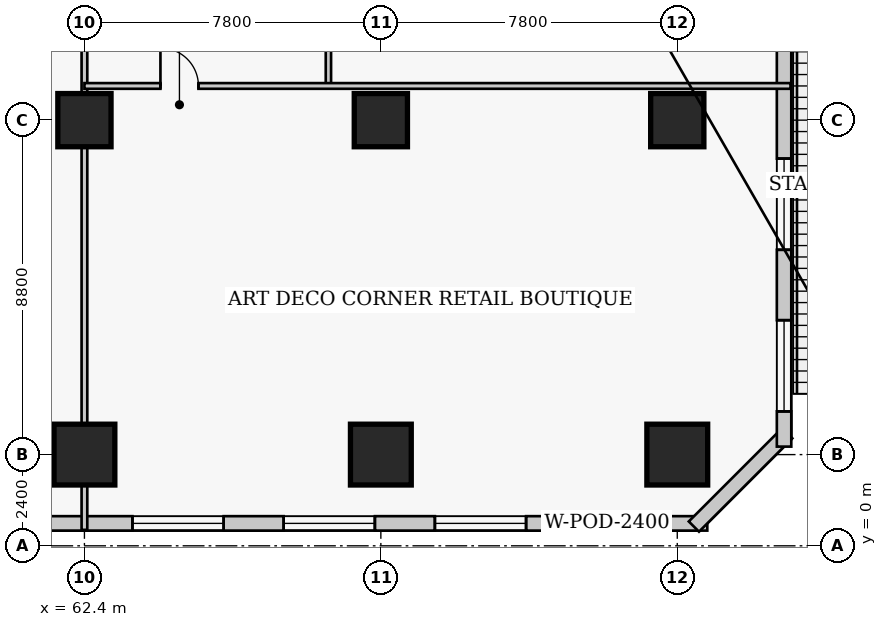
"""IFC4 building model, lengths in metres.
Left out: names, types, materials, properties, quantities, classifications, styles, units other than length and angle.
Written with IfcOpenShell. Run it as: python <this file> out.ifc"""

import sys

from ifc_helpers import new_model, si_unit, direction, frame, frame_2d, origin, origin_2d, place, context, subcontext, project, spatial, rectangle, extrude, element, fill, save


model = new_model("IFC4")
c1 = context("Model", 3, precision=1e-05, world=origin(), true_north=direction((0.0, 1.0)))
c2 = subcontext(c1, "Body", "Model", "MODEL_VIEW")
j1 = project(units=[si_unit("LENGTHUNIT", "METRE"), si_unit("PLANEANGLEUNIT", "RADIAN")], contexts=[c1])
p1 = place(None, origin())
s1 = spatial("IfcSite", under=j1, at=p1, CompositionType="ELEMENT")
p2 = place(p1, origin())
s2 = spatial("IfcBuilding", under=s1, at=p2, CompositionType="ELEMENT")
p3 = place(p2, origin())
s3 = spatial("IfcBuildingStorey", under=s2, at=p3, CompositionType="ELEMENT", Elevation=0.0)
p4 = place(p3, frame((62.4, 2.4, 0.0), z_axis=(0.0, 0.0, 1.0), x_axis=(1.0, 0.0, 0.0)))
e1 = element("IfcColumn", 1, at=p4, inside=s3, PredefinedType="COLUMN", context=c2, shape_type="SweptSolid", body=[
    extrude(rectangle(XDim=1.6, YDim=1.6, at=origin_2d()), origin(), (0.0, 0.0, 1.0), 5.4),
])
p5 = place(p3, frame((62.4, 11.2, 0.0), z_axis=(0.0, 0.0, 1.0), x_axis=(1.0, 0.0, 0.0)))
e2 = element("IfcColumn", 2, at=p5, inside=s3, PredefinedType="COLUMN", context=c2, shape_type="SweptSolid", body=[
    extrude(rectangle(XDim=1.4, YDim=1.4, at=origin_2d()), origin(), (0.0, 0.0, 1.0), 5.4),
])
p6 = place(p3, frame((70.2, 2.4, 0.0), z_axis=(0.0, 0.0, 1.0), x_axis=(1.0, 0.0, 0.0)))
e3 = element("IfcColumn", 3, at=p6, inside=s3, PredefinedType="COLUMN", context=c2, shape_type="SweptSolid", body=[
    extrude(rectangle(XDim=1.6, YDim=1.6, at=origin_2d()), origin(), (0.0, 0.0, 1.0), 5.4),
])
p7 = place(p3, frame((70.2, 11.2, 0.0), z_axis=(0.0, 0.0, 1.0), x_axis=(1.0, 0.0, 0.0)))
e4 = element("IfcColumn", 4, at=p7, inside=s3, PredefinedType="COLUMN", context=c2, shape_type="SweptSolid", body=[
    extrude(rectangle(XDim=1.4, YDim=1.4, at=origin_2d()), origin(), (0.0, 0.0, 1.0), 5.4),
])
p8 = place(p3, frame((78.0, 2.4, 0.0), z_axis=(0.0, 0.0, 1.0), x_axis=(1.0, 0.0, 0.0)))
e5 = element("IfcColumn", 5, at=p8, inside=s3, PredefinedType="COLUMN", context=c2, shape_type="SweptSolid", body=[
    extrude(rectangle(XDim=1.6, YDim=1.6, at=origin_2d()), origin(), (0.0, 0.0, 1.0), 5.4),
])
p9 = place(p3, frame((78.0, 11.2, 0.0), z_axis=(0.0, 0.0, 1.0), x_axis=(1.0, 0.0, 0.0)))
e6 = element("IfcColumn", 6, at=p9, inside=s3, PredefinedType="COLUMN", context=c2, shape_type="SweptSolid", body=[
    extrude(rectangle(XDim=1.4, YDim=1.4, at=origin_2d()), origin(), (0.0, 0.0, 1.0), 5.4),
])
p10 = place(p3, frame((78.79, 0.59, 0.0), z_axis=(0.0, 0.0, 1.0), x_axis=(-1.0, 0.0, 0.0)))
e7 = element("IfcWall", 7, at=p10, inside=s3, PredefinedType="SOLIDWALL", context=c2, shape_type="SweptSolid", body=[
    extrude(rectangle(XDim=79.58, YDim=0.38, at=frame_2d((39.79, 0.0))), origin(), (0.0, 0.0, 1.0), 5.1),
])
p11 = place(p10, frame((68.44, 0.0, 0.0)))
e8 = element("IfcOpeningElement", 8, at=p11, cuts=e7, PredefinedType="OPENING", context=c2, shape_type="SweptSolid", body=[
    extrude(rectangle(XDim=1.6, YDim=2.2, at=frame_2d((0.8, 1.1))), frame((0.0, 0.2, 0.0), z_axis=(0.0, -1.0, 0.0), x_axis=(1.0, 0.0, 0.0)), (0.0, 0.0, 1.0), 0.4),
])
p12 = place(p10, frame((56.79, 0.0, 0.0)))
e9 = element("IfcOpeningElement", 9, at=p12, cuts=e7, PredefinedType="OPENING", context=c2, shape_type="SweptSolid", body=[
    extrude(rectangle(XDim=2.4, YDim=2.55, at=frame_2d((1.2, 1.275))), frame((0.0, 0.2, 0.0), z_axis=(0.0, -1.0, 0.0), x_axis=(1.0, 0.0, 0.0)), (0.0, 0.0, 1.0), 0.4),
])
p13 = place(p10, frame((38.59, 0.0, 0.0)))
e10 = element("IfcOpeningElement", 10, at=p13, cuts=e7, PredefinedType="OPENING", context=c2, shape_type="SweptSolid", body=[
    extrude(rectangle(XDim=2.4, YDim=2.55, at=frame_2d((1.2, 1.275))), frame((0.0, 0.2, 0.0), z_axis=(0.0, -1.0, 0.0), x_axis=(1.0, 0.0, 0.0)), (0.0, 0.0, 1.0), 0.4),
])
p14 = place(p10, frame((19.49, 0.0, 0.0)))
e11 = element("IfcOpeningElement", 11, at=p14, cuts=e7, PredefinedType="OPENING", context=c2, shape_type="SweptSolid", body=[
    extrude(rectangle(XDim=1.6, YDim=2.2, at=frame_2d((0.8, 1.1))), frame((0.0, 0.2, 0.0), z_axis=(0.0, -1.0, 0.0), x_axis=(1.0, 0.0, 0.0)), (0.0, 0.0, 1.0), 0.4),
])
p15 = place(p10, frame((1.439, 0.0, 0.75)))
e12 = element("IfcOpeningElement", 12, at=p15, cuts=e7, PredefinedType="OPENING", context=c2, shape_type="SweptSolid", body=[
    extrude(rectangle(XDim=2.4, YDim=2.2, at=frame_2d((1.2, 1.1))), frame((0.0, 0.2, 0.0), z_axis=(0.0, -1.0, 0.0), x_axis=(1.0, 0.0, 0.0)), (0.0, 0.0, 1.0), 0.4),
])
p16 = place(p10, frame((4.769, 0.0, 0.75)))
e13 = element("IfcOpeningElement", 13, at=p16, cuts=e7, PredefinedType="OPENING", context=c2, shape_type="SweptSolid", body=[
    extrude(rectangle(XDim=2.4, YDim=2.2, at=frame_2d((1.2, 1.1))), frame((0.0, 0.2, 0.0), z_axis=(0.0, -1.0, 0.0), x_axis=(1.0, 0.0, 0.0)), (0.0, 0.0, 1.0), 0.4),
])
p17 = place(p10, frame((8.748, 0.0, 0.75)))
e14 = element("IfcOpeningElement", 14, at=p17, cuts=e7, PredefinedType="OPENING", context=c2, shape_type="SweptSolid", body=[
    extrude(rectangle(XDim=2.4, YDim=2.2, at=frame_2d((1.2, 1.1))), frame((0.0, 0.2, 0.0), z_axis=(0.0, -1.0, 0.0), x_axis=(1.0, 0.0, 0.0)), (0.0, 0.0, 1.0), 0.4),
])
p18 = place(p10, frame((12.727, 0.0, 0.75)))
e15 = element("IfcOpeningElement", 15, at=p18, cuts=e7, PredefinedType="OPENING", context=c2, shape_type="SweptSolid", body=[
    extrude(rectangle(XDim=2.4, YDim=2.2, at=frame_2d((1.2, 1.1))), frame((0.0, 0.2, 0.0), z_axis=(0.0, -1.0, 0.0), x_axis=(1.0, 0.0, 0.0)), (0.0, 0.0, 1.0), 0.4),
])
p19 = place(p10, frame((24.664, 0.0, 0.75)))
e16 = element("IfcOpeningElement", 16, at=p19, cuts=e7, PredefinedType="OPENING", context=c2, shape_type="SweptSolid", body=[
    extrude(rectangle(XDim=2.4, YDim=2.2, at=frame_2d((1.2, 1.1))), frame((0.0, 0.2, 0.0), z_axis=(0.0, -1.0, 0.0), x_axis=(1.0, 0.0, 0.0)), (0.0, 0.0, 1.0), 0.4),
])
p20 = place(p10, frame((28.643, 0.0, 0.75)))
e17 = element("IfcOpeningElement", 17, at=p20, cuts=e7, PredefinedType="OPENING", context=c2, shape_type="SweptSolid", body=[
    extrude(rectangle(XDim=2.4, YDim=2.2, at=frame_2d((1.2, 1.1))), frame((0.0, 0.2, 0.0), z_axis=(0.0, -1.0, 0.0), x_axis=(1.0, 0.0, 0.0)), (0.0, 0.0, 1.0), 0.4),
])
p21 = place(p10, frame((32.622, 0.0, 0.75)))
e18 = element("IfcOpeningElement", 18, at=p21, cuts=e7, PredefinedType="OPENING", context=c2, shape_type="SweptSolid", body=[
    extrude(rectangle(XDim=2.4, YDim=2.2, at=frame_2d((1.2, 1.1))), frame((0.0, 0.2, 0.0), z_axis=(0.0, -1.0, 0.0), x_axis=(1.0, 0.0, 0.0)), (0.0, 0.0, 1.0), 0.4),
])
p22 = place(p10, frame((44.559, 0.0, 0.75)))
e19 = element("IfcOpeningElement", 19, at=p22, cuts=e7, PredefinedType="OPENING", context=c2, shape_type="SweptSolid", body=[
    extrude(rectangle(XDim=2.4, YDim=2.2, at=frame_2d((1.2, 1.1))), frame((0.0, 0.2, 0.0), z_axis=(0.0, -1.0, 0.0), x_axis=(1.0, 0.0, 0.0)), (0.0, 0.0, 1.0), 0.4),
])
p23 = place(p10, frame((48.538, 0.0, 0.75)))
e20 = element("IfcOpeningElement", 20, at=p23, cuts=e7, PredefinedType="OPENING", context=c2, shape_type="SweptSolid", body=[
    extrude(rectangle(XDim=2.4, YDim=2.2, at=frame_2d((1.2, 1.1))), frame((0.0, 0.2, 0.0), z_axis=(0.0, -1.0, 0.0), x_axis=(1.0, 0.0, 0.0)), (0.0, 0.0, 1.0), 0.4),
])
p24 = place(p10, frame((52.517, 0.0, 0.75)))
e21 = element("IfcOpeningElement", 21, at=p24, cuts=e7, PredefinedType="OPENING", context=c2, shape_type="SweptSolid", body=[
    extrude(rectangle(XDim=2.4, YDim=2.2, at=frame_2d((1.2, 1.1))), frame((0.0, 0.2, 0.0), z_axis=(0.0, -1.0, 0.0), x_axis=(1.0, 0.0, 0.0)), (0.0, 0.0, 1.0), 0.4),
])
p25 = place(p10, frame((60.475, 0.0, 0.75)))
e22 = element("IfcOpeningElement", 22, at=p25, cuts=e7, PredefinedType="OPENING", context=c2, shape_type="SweptSolid", body=[
    extrude(rectangle(XDim=2.4, YDim=2.2, at=frame_2d((1.2, 1.1))), frame((0.0, 0.2, 0.0), z_axis=(0.0, -1.0, 0.0), x_axis=(1.0, 0.0, 0.0)), (0.0, 0.0, 1.0), 0.4),
])
p26 = place(p10, frame((72.412, 0.0, 0.75)))
e23 = element("IfcOpeningElement", 23, at=p26, cuts=e7, PredefinedType="OPENING", context=c2, shape_type="SweptSolid", body=[
    extrude(rectangle(XDim=2.4, YDim=2.2, at=frame_2d((1.2, 1.1))), frame((0.0, 0.2, 0.0), z_axis=(0.0, -1.0, 0.0), x_axis=(1.0, 0.0, 0.0)), (0.0, 0.0, 1.0), 0.4),
])
p27 = place(p10, frame((75.74, 0.0, 0.75)))
e24 = element("IfcOpeningElement", 24, at=p27, cuts=e7, PredefinedType="OPENING", context=c2, shape_type="SweptSolid", body=[
    extrude(rectangle(XDim=2.4, YDim=2.2, at=frame_2d((1.2, 1.1))), frame((0.0, 0.2, 0.0), z_axis=(0.0, -1.0, 0.0), x_axis=(1.0, 0.0, 0.0)), (0.0, 0.0, 1.0), 0.4),
])
p28 = place(p3, frame((80.894, 2.963, 0.0), z_axis=(0.0, 0.0, 1.0), x_axis=(-0.707071641081, -0.707141919546, 0.0)))
e25 = element("IfcWall", 25, at=p28, inside=s3, PredefinedType="SOLIDWALL", context=c2, shape_type="SweptSolid", body=[
    extrude(rectangle(XDim=3.474, YDim=0.38, at=frame_2d((1.737, 0.0))), origin(), (0.0, 0.0, 1.0), 5.1),
])
p29 = place(p3, frame((80.81, 49.39, 0.0), z_axis=(0.0, 0.0, 1.0), x_axis=(0.0, -1.0, 0.0)))
e26 = element("IfcWall", 26, at=p29, inside=s3, PredefinedType="SOLIDWALL", context=c2, shape_type="SweptSolid", body=[
    extrude(rectangle(XDim=46.78, YDim=0.38, at=frame_2d((23.39, 0.0))), origin(), (0.0, 0.0, 1.0), 5.1),
])
p30 = place(p29, frame((15.29, 0.0, 0.0)))
e27 = element("IfcOpeningElement", 27, at=p30, cuts=e26, PredefinedType="OPENING", context=c2, shape_type="SweptSolid", body=[
    extrude(rectangle(XDim=3.2, YDim=2.6, at=frame_2d((1.6, 1.3))), frame((0.0, 0.2, 0.0), z_axis=(0.0, -1.0, 0.0), x_axis=(1.0, 0.0, 0.0)), (0.0, 0.0, 1.0), 0.4),
])
p31 = place(p29, frame((9.99, 0.0, 0.0)))
e28 = element("IfcOpeningElement", 28, at=p31, cuts=e26, PredefinedType="OPENING", context=c2, shape_type="SweptSolid", body=[
    extrude(rectangle(XDim=3.2, YDim=2.6, at=frame_2d((1.6, 1.3))), frame((0.0, 0.2, 0.0), z_axis=(0.0, -1.0, 0.0), x_axis=(1.0, 0.0, 0.0)), (0.0, 0.0, 1.0), 0.4),
])
p32 = place(p29, frame((4.99, 0.0, 0.0)))
e29 = element("IfcOpeningElement", 29, at=p32, cuts=e26, PredefinedType="OPENING", context=c2, shape_type="SweptSolid", body=[
    extrude(rectangle(XDim=3.2, YDim=2.6, at=frame_2d((1.6, 1.3))), frame((0.0, 0.2, 0.0), z_axis=(0.0, -1.0, 0.0), x_axis=(1.0, 0.0, 0.0)), (0.0, 0.0, 1.0), 0.4),
])
p33 = place(p29, frame((0.79, 0.0, 0.0)))
e30 = element("IfcOpeningElement", 30, at=p33, cuts=e26, PredefinedType="OPENING", context=c2, shape_type="SweptSolid", body=[
    extrude(rectangle(XDim=3.2, YDim=2.6, at=frame_2d((1.6, 1.3))), frame((0.0, 0.2, 0.0), z_axis=(0.0, -1.0, 0.0), x_axis=(1.0, 0.0, 0.0)), (0.0, 0.0, 1.0), 0.4),
])
p34 = place(p29, frame((19.087, 0.0, 0.75)))
e31 = element("IfcOpeningElement", 31, at=p34, cuts=e26, PredefinedType="OPENING", context=c2, shape_type="SweptSolid", body=[
    extrude(rectangle(XDim=2.4, YDim=2.2, at=frame_2d((1.2, 1.1))), frame((0.0, 0.2, 0.0), z_axis=(0.0, -1.0, 0.0), x_axis=(1.0, 0.0, 0.0)), (0.0, 0.0, 1.0), 0.4),
])
p35 = place(p29, frame((26.443, 0.0, 0.75)))
e32 = element("IfcOpeningElement", 32, at=p35, cuts=e26, PredefinedType="OPENING", context=c2, shape_type="SweptSolid", body=[
    extrude(rectangle(XDim=2.4, YDim=2.2, at=frame_2d((1.2, 1.1))), frame((0.0, 0.2, 0.0), z_axis=(0.0, -1.0, 0.0), x_axis=(1.0, 0.0, 0.0)), (0.0, 0.0, 1.0), 0.4),
])
p36 = place(p29, frame((31.845, 0.0, 0.75)))
e33 = element("IfcOpeningElement", 33, at=p36, cuts=e26, PredefinedType="OPENING", context=c2, shape_type="SweptSolid", body=[
    extrude(rectangle(XDim=2.4, YDim=2.2, at=frame_2d((1.2, 1.1))), frame((0.0, 0.2, 0.0), z_axis=(0.0, -1.0, 0.0), x_axis=(1.0, 0.0, 0.0)), (0.0, 0.0, 1.0), 0.4),
])
p37 = place(p29, frame((39.201, 0.0, 0.75)))
e34 = element("IfcOpeningElement", 34, at=p37, cuts=e26, PredefinedType="OPENING", context=c2, shape_type="SweptSolid", body=[
    extrude(rectangle(XDim=2.4, YDim=2.2, at=frame_2d((1.2, 1.1))), frame((0.0, 0.2, 0.0), z_axis=(0.0, -1.0, 0.0), x_axis=(1.0, 0.0, 0.0)), (0.0, 0.0, 1.0), 0.4),
])
p38 = place(p29, frame((43.454, 0.0, 0.75)))
e35 = element("IfcOpeningElement", 35, at=p38, cuts=e26, PredefinedType="OPENING", context=c2, shape_type="SweptSolid", body=[
    extrude(rectangle(XDim=2.4, YDim=2.2, at=frame_2d((1.2, 1.1))), frame((0.0, 0.2, 0.0), z_axis=(0.0, -1.0, 0.0), x_axis=(1.0, 0.0, 0.0)), (0.0, 0.0, 1.0), 0.4),
])
p39 = place(p3, frame((62.4, 0.42, 0.0), z_axis=(0.0, 0.0, 1.0), x_axis=(0.0, 1.0, 0.0)))
e36 = element("IfcWall", 36, at=p39, inside=s3, PredefinedType="PARTITIONING", context=c2, shape_type="SweptSolid", body=[
    extrude(rectangle(XDim=23.1, YDim=0.15, at=frame_2d((11.55, 0.0))), origin(), (0.0, 0.0, 1.0), 4.35),
])
p40 = place(p3, frame((68.82, 12.1, 0.0), z_axis=(0.0, 0.0, 1.0), x_axis=(0.0, 1.0, 0.0)))
e37 = element("IfcWall", 37, at=p40, inside=s3, PredefinedType="PLUMBINGWALL", context=c2, shape_type="SweptSolid", body=[
    extrude(rectangle(XDim=5.92, YDim=0.14, at=frame_2d((2.96, 0.0))), origin(), (0.0, 0.0, 1.0), 5.1),
])
p41 = place(p3, frame((62.4, 12.1, 0.0), z_axis=(0.0, 0.0, 1.0), x_axis=(1.0, 0.0, 0.0)))
e38 = element("IfcWall", 38, at=p41, inside=s3, PredefinedType="PARTITIONING", context=c2, shape_type="SweptSolid", body=[
    extrude(rectangle(XDim=18.58, YDim=0.15, at=frame_2d((9.29, 0.0))), origin(), (0.0, 0.0, 1.0), 5.1),
])
p42 = place(p41, frame((2.0, 0.0, 0.0)))
e39 = element("IfcOpeningElement", 39, at=p42, cuts=e38, PredefinedType="OPENING", context=c2, shape_type="SweptSolid", body=[
    extrude(rectangle(XDim=1.0, YDim=2.15, at=frame_2d((0.5, 1.075))), frame((0.0, 0.085, 0.0), z_axis=(0.0, -1.0, 0.0), x_axis=(1.0, 0.0, 0.0)), (0.0, 0.0, 1.0), 0.17),
])
p43 = place(p15, origin())
e40 = element("IfcWindow", 40, at=p43, inside=s3, PartitioningType="SINGLE_PANEL", PredefinedType="WINDOW", context=c2, shape_type="SweptSolid", body=[
    extrude(rectangle(XDim=2.4, YDim=2.2, at=frame_2d((1.2, 1.1))), frame((0.0, 0.03, 0.0), z_axis=(0.0, -1.0, 0.0), x_axis=(1.0, 0.0, 0.0)), (0.0, 0.0, 1.0), 0.06),
])
fill(e12, e40)
p44 = place(p16, origin())
e41 = element("IfcWindow", 41, at=p44, inside=s3, PartitioningType="SINGLE_PANEL", PredefinedType="WINDOW", context=c2, shape_type="SweptSolid", body=[
    extrude(rectangle(XDim=2.4, YDim=2.2, at=frame_2d((1.2, 1.1))), frame((0.0, 0.03, 0.0), z_axis=(0.0, -1.0, 0.0), x_axis=(1.0, 0.0, 0.0)), (0.0, 0.0, 1.0), 0.06),
])
fill(e13, e41)
p45 = place(p17, origin())
e42 = element("IfcWindow", 42, at=p45, inside=s3, PartitioningType="SINGLE_PANEL", PredefinedType="WINDOW", context=c2, shape_type="SweptSolid", body=[
    extrude(rectangle(XDim=2.4, YDim=2.2, at=frame_2d((1.2, 1.1))), frame((0.0, 0.03, 0.0), z_axis=(0.0, -1.0, 0.0), x_axis=(1.0, 0.0, 0.0)), (0.0, 0.0, 1.0), 0.06),
])
fill(e14, e42)
p46 = place(p18, origin())
e43 = element("IfcWindow", 43, at=p46, inside=s3, PartitioningType="SINGLE_PANEL", PredefinedType="WINDOW", context=c2, shape_type="SweptSolid", body=[
    extrude(rectangle(XDim=2.4, YDim=2.2, at=frame_2d((1.2, 1.1))), frame((0.0, 0.03, 0.0), z_axis=(0.0, -1.0, 0.0), x_axis=(1.0, 0.0, 0.0)), (0.0, 0.0, 1.0), 0.06),
])
fill(e15, e43)
p47 = place(p37, origin())
e44 = element("IfcWindow", 44, at=p47, inside=s3, PartitioningType="SINGLE_PANEL", PredefinedType="WINDOW", context=c2, shape_type="SweptSolid", body=[
    extrude(rectangle(XDim=2.4, YDim=2.2, at=frame_2d((1.2, 1.1))), frame((0.0, 0.03, 0.0), z_axis=(0.0, -1.0, 0.0), x_axis=(1.0, 0.0, 0.0)), (0.0, 0.0, 1.0), 0.06),
])
fill(e34, e44)
p48 = place(p38, origin())
e45 = element("IfcWindow", 45, at=p48, inside=s3, PartitioningType="SINGLE_PANEL", PredefinedType="WINDOW", context=c2, shape_type="SweptSolid", body=[
    extrude(rectangle(XDim=2.4, YDim=2.2, at=frame_2d((1.2, 1.1))), frame((0.0, 0.03, 0.0), z_axis=(0.0, -1.0, 0.0), x_axis=(1.0, 0.0, 0.0)), (0.0, 0.0, 1.0), 0.06),
])
fill(e35, e45)
p49 = place(p42, origin())
e46 = element("IfcDoor", 46, at=p49, inside=s3, OperationType="SINGLE_SWING_LEFT", PredefinedType="DOOR", context=c2, shape_type="SweptSolid", body=[
    extrude(rectangle(XDim=1.0, YDim=2.15, at=frame_2d((0.5, 1.075))), frame((0.0, 0.025, 0.0), z_axis=(0.0, -1.0, 0.0), x_axis=(1.0, 0.0, 0.0)), (0.0, 0.0, 1.0), 0.05),
])
fill(e39, e46)
save(model, sys.argv[1])
